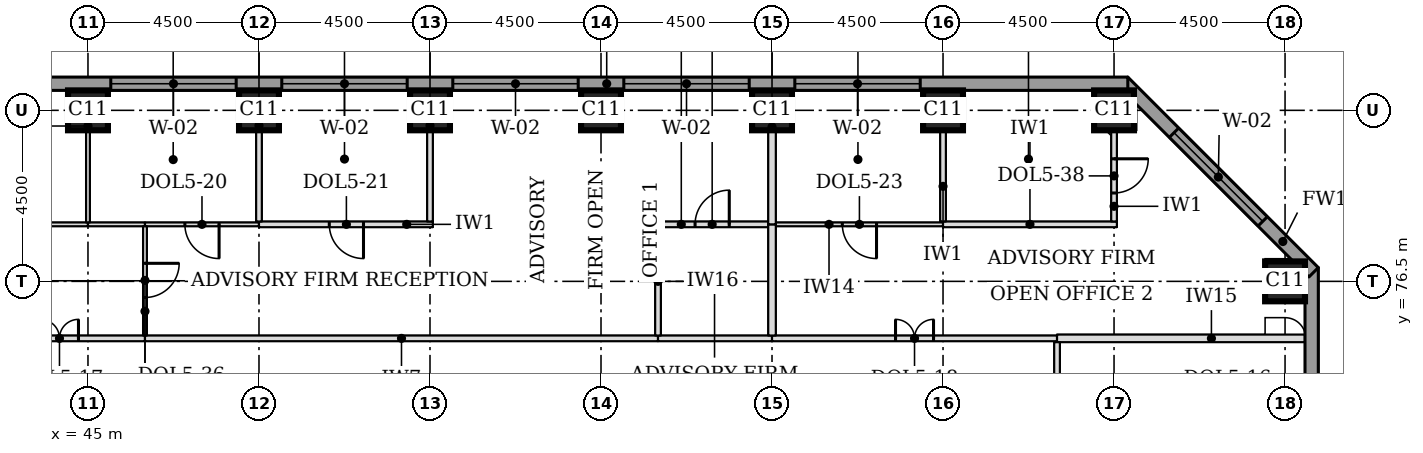
"""IFC4 building model, lengths in metres.
Left out: names, types, materials, properties, quantities, classifications, styles, units other than length and angle.
Written with IfcOpenShell. Run it as: python <this file> out.ifc"""

import sys

from ifc_helpers import new_model, si_unit, direction, frame, frame_2d, origin, origin_2d, place, context, subcontext, project, spatial, rectangle, extrude, element, fill, save


model = new_model("IFC4")
c1 = context("Model", 3, precision=1e-05, world=origin(), true_north=direction((0.0, 1.0)))
c2 = subcontext(c1, "Body", "Model", "MODEL_VIEW")
j1 = project(units=[si_unit("LENGTHUNIT", "METRE"), si_unit("PLANEANGLEUNIT", "RADIAN")], contexts=[c1])
p1 = place(None, origin())
s1 = spatial("IfcSite", under=j1, at=p1, CompositionType="ELEMENT")
p2 = place(p1, origin())
s2 = spatial("IfcBuilding", under=s1, at=p2, CompositionType="ELEMENT")
p3 = place(p2, frame((0.0, 0.0, 112.2)))
s3 = spatial("IfcBuildingStorey", under=s2, at=p3, CompositionType="ELEMENT", Elevation=112.2)
for number, where, z_axis, x_axis in (
    (1, (76.5, 76.5, 0.0), (0.0, 0.0, 1.0), (1.0, 0.0, 0.0)),
    (2, (45.0, 81.0, 0.0), (0.0, 0.0, 1.0), (1.0, 0.0, 0.0)),
    (3, (49.5, 81.0, 0.0), (0.0, 0.0, 1.0), (1.0, 0.0, 0.0)),
    (4, (54.0, 81.0, 0.0), (0.0, 0.0, 1.0), (1.0, 0.0, 0.0)),
    (5, (58.5, 81.0, 0.0), (0.0, 0.0, 1.0), (1.0, 0.0, 0.0)),
    (6, (63.0, 81.0, 0.0), (0.0, 0.0, 1.0), (1.0, 0.0, 0.0)),
    (7, (67.5, 81.0, 0.0), (0.0, 0.0, 1.0), (1.0, 0.0, 0.0)),
    (8, (72.0, 81.0, 0.0), (0.0, 0.0, 1.0), (1.0, 0.0, 0.0)),
):
    element("IfcColumn", number, at=place(p3, frame(where, z_axis=z_axis, x_axis=x_axis)), inside=s3, PredefinedType="COLUMN", context=c2, shape_type="SweptSolid", body=[
        extrude(rectangle(XDim=1.05, YDim=1.05, at=origin_2d()), origin(), (0.0, 0.0, 1.0), 3.7),
    ])
p4 = place(p3, frame((77.2, 44.638, 0.0), z_axis=(0.0, 0.0, 1.0), x_axis=(0.0, 1.0, 0.0)))
e9 = element("IfcWall", 9, at=p4, inside=s3, PredefinedType="STANDARD", context=c2, shape_type="SweptSolid", body=[
    extrude(rectangle(XDim=32.225, YDim=0.35, at=frame_2d((16.112, 0.0))), origin(), (0.0, 0.0, 1.0), 3.525),
])
p5 = place(p4, frame((5.462, 0.0, 0.9)))
e10 = element("IfcOpeningElement", 10, at=p5, cuts=e9, PredefinedType="OPENING", context=c2, shape_type="SweptSolid", body=[
    extrude(rectangle(XDim=3.3, YDim=1.9, at=frame_2d((1.65, 0.95))), frame((0.0, 0.185, 0.0), z_axis=(0.0, -1.0, 0.0), x_axis=(1.0, 0.0, 0.0)), (0.0, 0.0, 1.0), 0.37),
])
p6 = place(p4, frame((9.962, 0.0, 0.9)))
e11 = element("IfcOpeningElement", 11, at=p6, cuts=e9, PredefinedType="OPENING", context=c2, shape_type="SweptSolid", body=[
    extrude(rectangle(XDim=3.3, YDim=1.9, at=frame_2d((1.65, 0.95))), frame((0.0, 0.185, 0.0), z_axis=(0.0, -1.0, 0.0), x_axis=(1.0, 0.0, 0.0)), (0.0, 0.0, 1.0), 0.37),
])
p7 = place(p4, frame((14.462, 0.0, 0.9)))
e12 = element("IfcOpeningElement", 12, at=p7, cuts=e9, PredefinedType="OPENING", context=c2, shape_type="SweptSolid", body=[
    extrude(rectangle(XDim=3.3, YDim=1.9, at=frame_2d((1.65, 0.95))), frame((0.0, 0.185, 0.0), z_axis=(0.0, -1.0, 0.0), x_axis=(1.0, 0.0, 0.0)), (0.0, 0.0, 1.0), 0.37),
])
p8 = place(p4, frame((18.962, 0.0, 0.9)))
e13 = element("IfcOpeningElement", 13, at=p8, cuts=e9, PredefinedType="OPENING", context=c2, shape_type="SweptSolid", body=[
    extrude(rectangle(XDim=3.3, YDim=1.9, at=frame_2d((1.65, 0.95))), frame((0.0, 0.185, 0.0), z_axis=(0.0, -1.0, 0.0), x_axis=(1.0, 0.0, 0.0)), (0.0, 0.0, 1.0), 0.37),
])
p9 = place(p4, frame((23.462, 0.0, 0.9)))
e14 = element("IfcOpeningElement", 14, at=p9, cuts=e9, PredefinedType="OPENING", context=c2, shape_type="SweptSolid", body=[
    extrude(rectangle(XDim=3.3, YDim=1.9, at=frame_2d((1.65, 0.95))), frame((0.0, 0.185, 0.0), z_axis=(0.0, -1.0, 0.0), x_axis=(1.0, 0.0, 0.0)), (0.0, 0.0, 1.0), 0.37),
])
p10 = place(p3, frame((77.251, 76.739, 0.0), z_axis=(0.0, 0.0, 1.0), x_axis=(-0.707106781187, 0.707106781187, 0.0)))
e15 = element("IfcWall", 15, at=p10, inside=s3, PredefinedType="STANDARD", context=c2, shape_type="SweptSolid", body=[
    extrude(rectangle(XDim=7.089, YDim=0.35, at=frame_2d((3.544, 0.0))), origin(), (0.0, 0.0, 1.0), 3.525),
])
p11 = place(p10, frame((1.894, 0.0, 0.9)))
e16 = element("IfcOpeningElement", 16, at=p11, cuts=e15, PredefinedType="OPENING", context=c2, shape_type="SweptSolid", body=[
    extrude(rectangle(XDim=3.3, YDim=1.9, at=frame_2d((1.65, 0.95))), frame((0.0, 0.185, 0.0), z_axis=(0.0, -1.0, 0.0), x_axis=(1.0, 0.0, 0.0)), (0.0, 0.0, 1.0), 0.37),
])
p12 = place(p3, frame((72.362, 81.7, 0.0), z_axis=(0.0, 0.0, 1.0), x_axis=(-1.0, 0.0, 0.0)))
e17 = element("IfcWall", 17, at=p12, inside=s3, PredefinedType="STANDARD", context=c2, shape_type="SweptSolid", body=[
    extrude(rectangle(XDim=32.225, YDim=0.35, at=frame_2d((16.112, 0.0))), origin(), (0.0, 0.0, 1.0), 3.525),
])
p13 = place(p12, frame((5.462, 0.0, 0.9)))
e18 = element("IfcOpeningElement", 18, at=p13, cuts=e17, PredefinedType="OPENING", context=c2, shape_type="SweptSolid", body=[
    extrude(rectangle(XDim=3.3, YDim=1.9, at=frame_2d((1.65, 0.95))), frame((0.0, 0.185, 0.0), z_axis=(0.0, -1.0, 0.0), x_axis=(1.0, 0.0, 0.0)), (0.0, 0.0, 1.0), 0.37),
])
p14 = place(p12, frame((9.962, 0.0, 0.9)))
e19 = element("IfcOpeningElement", 19, at=p14, cuts=e17, PredefinedType="OPENING", context=c2, shape_type="SweptSolid", body=[
    extrude(rectangle(XDim=3.3, YDim=1.9, at=frame_2d((1.65, 0.95))), frame((0.0, 0.185, 0.0), z_axis=(0.0, -1.0, 0.0), x_axis=(1.0, 0.0, 0.0)), (0.0, 0.0, 1.0), 0.37),
])
p15 = place(p12, frame((14.462, 0.0, 0.9)))
e20 = element("IfcOpeningElement", 20, at=p15, cuts=e17, PredefinedType="OPENING", context=c2, shape_type="SweptSolid", body=[
    extrude(rectangle(XDim=3.3, YDim=1.9, at=frame_2d((1.65, 0.95))), frame((0.0, 0.185, 0.0), z_axis=(0.0, -1.0, 0.0), x_axis=(1.0, 0.0, 0.0)), (0.0, 0.0, 1.0), 0.37),
])
p16 = place(p12, frame((18.962, 0.0, 0.9)))
e21 = element("IfcOpeningElement", 21, at=p16, cuts=e17, PredefinedType="OPENING", context=c2, shape_type="SweptSolid", body=[
    extrude(rectangle(XDim=3.3, YDim=1.9, at=frame_2d((1.65, 0.95))), frame((0.0, 0.185, 0.0), z_axis=(0.0, -1.0, 0.0), x_axis=(1.0, 0.0, 0.0)), (0.0, 0.0, 1.0), 0.37),
])
p17 = place(p12, frame((23.462, 0.0, 0.9)))
e22 = element("IfcOpeningElement", 22, at=p17, cuts=e17, PredefinedType="OPENING", context=c2, shape_type="SweptSolid", body=[
    extrude(rectangle(XDim=3.3, YDim=1.9, at=frame_2d((1.65, 0.95))), frame((0.0, 0.185, 0.0), z_axis=(0.0, -1.0, 0.0), x_axis=(1.0, 0.0, 0.0)), (0.0, 0.0, 1.0), 0.37),
])
p18 = place(p3, frame((42.0, 75.0, 0.0), z_axis=(0.0, 0.0, 1.0), x_axis=(1.0, 0.0, 0.0)))
e23 = element("IfcWall", 23, at=p18, inside=s3, PredefinedType="PARTITIONING", context=c2, shape_type="SweptSolid", body=[
    extrude(rectangle(XDim=4.5, YDim=0.15, at=frame_2d((2.25, 0.0))), origin(), (0.0, 0.0, 1.0), 3.55),
])
p19 = place(p18, frame((1.75, 0.0, 0.0)))
e24 = element("IfcOpeningElement", 24, at=p19, cuts=e23, PredefinedType="OPENING", context=c2, shape_type="SweptSolid", body=[
    extrude(rectangle(XDim=1.0, YDim=2.1, at=frame_2d((0.5, 1.05))), frame((0.0, 0.085, 0.0), z_axis=(0.0, -1.0, 0.0), x_axis=(1.0, 0.0, 0.0)), (0.0, 0.0, 1.0), 0.17),
])
p20 = place(p3, frame((46.5, 75.0, 0.0), z_axis=(0.0, 0.0, 1.0), x_axis=(1.0, 0.0, 0.0)))
e25 = element("IfcWall", 25, at=p20, inside=s3, PredefinedType="PARTITIONING", context=c2, shape_type="SweptSolid", body=[
    extrude(rectangle(XDim=13.5, YDim=0.15, at=frame_2d((6.75, 0.0))), origin(), (0.0, 0.0, 1.0), 3.55),
])
p21 = place(p3, frame((60.0, 75.0, 0.0), z_axis=(0.0, 0.0, 1.0), x_axis=(1.0, 0.0, 0.0)))
e26 = element("IfcWall", 26, at=p21, inside=s3, PredefinedType="PARTITIONING", context=c2, shape_type="SweptSolid", body=[
    extrude(rectangle(XDim=3.0, YDim=0.15, at=frame_2d((1.5, 0.0))), origin(), (0.0, 0.0, 1.0), 3.55),
])
p22 = place(p3, frame((63.0, 75.0, 0.0), z_axis=(0.0, 0.0, 1.0), x_axis=(1.0, 0.0, 0.0)))
e27 = element("IfcWall", 27, at=p22, inside=s3, PredefinedType="PARTITIONING", context=c2, shape_type="SweptSolid", body=[
    extrude(rectangle(XDim=7.5, YDim=0.15, at=frame_2d((3.75, 0.0))), origin(), (0.0, 0.0, 1.0), 3.55),
])
p23 = place(p22, frame((3.25, 0.0, 0.0)))
e28 = element("IfcOpeningElement", 28, at=p23, cuts=e27, PredefinedType="OPENING", context=c2, shape_type="SweptSolid", body=[
    extrude(rectangle(XDim=1.0, YDim=2.1, at=frame_2d((0.5, 1.05))), frame((0.0, 0.085, 0.0), z_axis=(0.0, -1.0, 0.0), x_axis=(1.0, 0.0, 0.0)), (0.0, 0.0, 1.0), 0.17),
])
p24 = place(p3, frame((70.5, 75.0, 0.0), z_axis=(0.0, 0.0, 1.0), x_axis=(1.0, 0.0, 0.0)))
e29 = element("IfcWall", 29, at=p24, inside=s3, PredefinedType="PARTITIONING", context=c2, shape_type="SweptSolid", body=[
    extrude(rectangle(XDim=6.525, YDim=0.2, at=frame_2d((3.262, 0.0))), origin(), (0.0, 0.0, 1.0), 3.55),
])
p25 = place(p3, frame((40.55, 78.0, 0.0), z_axis=(0.0, 0.0, 1.0), x_axis=(1.0, 0.0, 0.0)))
e30 = element("IfcWall", 30, at=p25, inside=s3, PredefinedType="PARTITIONING", context=c2, shape_type="SweptSolid", body=[
    extrude(rectangle(XDim=4.45, YDim=0.1, at=frame_2d((2.225, 0.0))), origin(), (0.0, 0.0, 1.0), 3.55),
])
p26 = place(p25, frame((1.8, 0.0, 0.0)))
e31 = element("IfcOpeningElement", 31, at=p26, cuts=e30, PredefinedType="OPENING", context=c2, shape_type="SweptSolid", body=[
    extrude(rectangle(XDim=0.9, YDim=2.1, at=frame_2d((0.45, 1.05))), frame((0.0, 0.06, 0.0), z_axis=(0.0, -1.0, 0.0), x_axis=(1.0, 0.0, 0.0)), (0.0, 0.0, 1.0), 0.12),
])
p27 = place(p3, frame((45.0, 78.0, 0.0), z_axis=(0.0, 0.0, 1.0), x_axis=(1.0, 0.0, 0.0)))
e32 = element("IfcWall", 32, at=p27, inside=s3, PredefinedType="PARTITIONING", context=c2, shape_type="SweptSolid", body=[
    extrude(rectangle(XDim=1.5, YDim=0.1, at=frame_2d((0.75, 0.0))), origin(), (0.0, 0.0, 1.0), 3.55),
])
p28 = place(p3, frame((46.5, 78.0, 0.0), z_axis=(0.0, 0.0, 1.0), x_axis=(1.0, 0.0, 0.0)))
e33 = element("IfcWall", 33, at=p28, inside=s3, PredefinedType="PARTITIONING", context=c2, shape_type="SweptSolid", body=[
    extrude(rectangle(XDim=3.0, YDim=0.1, at=frame_2d((1.5, 0.0))), origin(), (0.0, 0.0, 1.0), 3.55),
])
p29 = place(p28, frame((1.05, 0.0, 0.0)))
e34 = element("IfcOpeningElement", 34, at=p29, cuts=e33, PredefinedType="OPENING", context=c2, shape_type="SweptSolid", body=[
    extrude(rectangle(XDim=0.9, YDim=2.1, at=frame_2d((0.45, 1.05))), frame((0.0, 0.06, 0.0), z_axis=(0.0, -1.0, 0.0), x_axis=(1.0, 0.0, 0.0)), (0.0, 0.0, 1.0), 0.12),
])
p30 = place(p3, frame((49.5, 78.0, 0.0), z_axis=(0.0, 0.0, 1.0), x_axis=(1.0, 0.0, 0.0)))
e35 = element("IfcWall", 35, at=p30, inside=s3, PredefinedType="PARTITIONING", context=c2, shape_type="SweptSolid", body=[
    extrude(rectangle(XDim=4.575, YDim=0.15, at=frame_2d((2.288, 0.0))), origin(), (0.0, 0.0, 1.0), 3.55),
])
p31 = place(p30, frame((1.85, 0.0, 0.0)))
e36 = element("IfcOpeningElement", 36, at=p31, cuts=e35, PredefinedType="OPENING", context=c2, shape_type="SweptSolid", body=[
    extrude(rectangle(XDim=0.9, YDim=2.1, at=frame_2d((0.45, 1.05))), frame((0.0, 0.085, 0.0), z_axis=(0.0, -1.0, 0.0), x_axis=(1.0, 0.0, 0.0)), (0.0, 0.0, 1.0), 0.17),
])
p32 = place(p3, frame((59.925, 78.0, 0.0), z_axis=(0.0, 0.0, 1.0), x_axis=(1.0, 0.0, 0.0)))
e37 = element("IfcWall", 37, at=p32, inside=s3, PredefinedType="PARTITIONING", context=c2, shape_type="SweptSolid", body=[
    extrude(rectangle(XDim=2.975, YDim=0.15, at=frame_2d((1.487, 0.0))), origin(), (0.0, 0.0, 1.0), 3.55),
])
p33 = place(p32, frame((1.05, 0.0, 0.0)))
e38 = element("IfcOpeningElement", 38, at=p33, cuts=e37, PredefinedType="OPENING", context=c2, shape_type="SweptSolid", body=[
    extrude(rectangle(XDim=0.9, YDim=2.1, at=frame_2d((0.45, 1.05))), frame((0.0, 0.085, 0.0), z_axis=(0.0, -1.0, 0.0), x_axis=(1.0, 0.0, 0.0)), (0.0, 0.0, 1.0), 0.17),
])
p34 = place(p3, frame((63.1, 78.0, 0.0), z_axis=(0.0, 0.0, 1.0), x_axis=(1.0, 0.0, 0.0)))
e39 = element("IfcWall", 39, at=p34, inside=s3, PredefinedType="PARTITIONING", context=c2, shape_type="SweptSolid", body=[
    extrude(rectangle(XDim=4.4, YDim=0.1, at=frame_2d((2.2, 0.0))), origin(), (0.0, 0.0, 1.0), 3.55),
])
p35 = place(p34, frame((1.75, 0.0, 0.0)))
e40 = element("IfcOpeningElement", 40, at=p35, cuts=e39, PredefinedType="OPENING", context=c2, shape_type="SweptSolid", body=[
    extrude(rectangle(XDim=0.9, YDim=2.1, at=frame_2d((0.45, 1.05))), frame((0.0, 0.06, 0.0), z_axis=(0.0, -1.0, 0.0), x_axis=(1.0, 0.0, 0.0)), (0.0, 0.0, 1.0), 0.12),
])
p36 = place(p3, frame((67.5, 78.0, 0.0), z_axis=(0.0, 0.0, 1.0), x_axis=(1.0, 0.0, 0.0)))
e41 = element("IfcWall", 41, at=p36, inside=s3, PredefinedType="PARTITIONING", context=c2, shape_type="SweptSolid", body=[
    extrude(rectangle(XDim=4.575, YDim=0.15, at=frame_2d((2.288, 0.0))), origin(), (0.0, 0.0, 1.0), 3.55),
])
p37 = place(p3, frame((70.5, 57.0, 0.0), z_axis=(0.0, 0.0, 1.0), x_axis=(0.0, 1.0, 0.0)))
e42 = element("IfcWall", 42, at=p37, inside=s3, PredefinedType="PARTITIONING", context=c2, shape_type="SweptSolid", body=[
    extrude(rectangle(XDim=17.9, YDim=0.15, at=frame_2d((8.95, 0.0))), origin(), (0.0, 0.0, 1.0), 3.55),
])
p38 = place(p37, frame((8.45, 0.0, 0.0)))
e43 = element("IfcOpeningElement", 43, at=p38, cuts=e42, PredefinedType="OPENING", context=c2, shape_type="SweptSolid", body=[
    extrude(rectangle(XDim=1.0, YDim=2.1, at=frame_2d((0.5, 1.05))), frame((0.0, 0.085, 0.0), z_axis=(0.0, -1.0, 0.0), x_axis=(1.0, 0.0, 0.0)), (0.0, 0.0, 1.0), 0.17),
])
p39 = place(p3, frame((46.5, 75.075, 0.0), z_axis=(0.0, 0.0, 1.0), x_axis=(0.0, 1.0, 0.0)))
e44 = element("IfcWall", 44, at=p39, inside=s3, PredefinedType="PARTITIONING", context=c2, shape_type="SweptSolid", body=[
    extrude(rectangle(XDim=2.875, YDim=0.1, at=frame_2d((1.438, 0.0))), origin(), (0.0, 0.0, 1.0), 3.022),
])
p40 = place(p39, frame((1.0, 0.0, 0.0)))
e45 = element("IfcOpeningElement", 45, at=p40, cuts=e44, PredefinedType="OPENING", context=c2, shape_type="SweptSolid", body=[
    extrude(rectangle(XDim=0.9, YDim=2.1, at=frame_2d((0.45, 1.05))), frame((0.0, 0.06, 0.0), z_axis=(0.0, -1.0, 0.0), x_axis=(1.0, 0.0, 0.0)), (0.0, 0.0, 1.0), 0.12),
])
p41 = place(p3, frame((60.0, 75.075, 0.0), z_axis=(0.0, 0.0, 1.0), x_axis=(0.0, 1.0, 0.0)))
e46 = element("IfcWall", 46, at=p41, inside=s3, PredefinedType="PARTITIONING", context=c2, shape_type="SweptSolid", body=[
    extrude(rectangle(XDim=2.85, YDim=0.15, at=frame_2d((1.425, 0.0))), origin(), (0.0, 0.0, 1.0), 3.55),
])
p42 = place(p3, frame((63.0, 75.075, 0.0), z_axis=(0.0, 0.0, 1.0), x_axis=(0.0, 1.0, 0.0)))
e47 = element("IfcWall", 47, at=p42, inside=s3, PredefinedType="PARTITIONING", context=c2, shape_type="SweptSolid", body=[
    extrude(rectangle(XDim=2.925, YDim=0.2, at=frame_2d((1.462, 0.0))), origin(), (0.0, 0.0, 1.0), 3.55),
])
p43 = place(p3, frame((63.0, 78.0, 0.0), z_axis=(0.0, 0.0, 1.0), x_axis=(0.0, 1.0, 0.0)))
e48 = element("IfcWall", 48, at=p43, inside=s3, PredefinedType="PARTITIONING", context=c2, shape_type="SweptSolid", body=[
    extrude(rectangle(XDim=3.525, YDim=0.2, at=frame_2d((1.762, 0.0))), origin(), (0.0, 0.0, 1.0), 3.55),
])
p44 = place(p3, frame((45.0, 78.05, 0.0), z_axis=(0.0, 0.0, 1.0), x_axis=(0.0, 1.0, 0.0)))
e49 = element("IfcWall", 49, at=p44, inside=s3, PredefinedType="PARTITIONING", context=c2, shape_type="SweptSolid", body=[
    extrude(rectangle(XDim=3.475, YDim=0.1, at=frame_2d((1.737, 0.0))), origin(), (0.0, 0.0, 1.0), 3.55),
])
for number, where, z_axis, x_axis in (
    (50, (49.5, 78.075, 0.0), (0.0, 0.0, 1.0), (0.0, 1.0, 0.0)),
    (51, (54.0, 78.075, 0.0), (0.0, 0.0, 1.0), (0.0, 1.0, 0.0)),
    (52, (67.5, 78.075, 0.0), (0.0, 0.0, 1.0), (0.0, 1.0, 0.0)),
):
    element("IfcWall", number, at=place(p3, frame(where, z_axis=z_axis, x_axis=x_axis)), inside=s3, PredefinedType="PARTITIONING", context=c2, shape_type="SweptSolid", body=[
        extrude(rectangle(XDim=3.45, YDim=0.15, at=frame_2d((1.725, 0.0))), origin(), (0.0, 0.0, 1.0), 3.55),
    ])
p45 = place(p3, frame((72.0, 78.075, 0.0), z_axis=(0.0, 0.0, 1.0), x_axis=(0.0, 1.0, 0.0)))
e53 = element("IfcWall", 53, at=p45, inside=s3, PredefinedType="PARTITIONING", context=c2, shape_type="SweptSolid", body=[
    extrude(rectangle(XDim=2.4, YDim=0.15, at=frame_2d((1.2, 0.0))), origin(), (0.0, 0.0, 1.0), 3.55),
])
p46 = place(p45, frame((0.75, 0.0, 0.0)))
e54 = element("IfcOpeningElement", 54, at=p46, cuts=e53, PredefinedType="OPENING", context=c2, shape_type="SweptSolid", body=[
    extrude(rectangle(XDim=0.9, YDim=2.1, at=frame_2d((0.45, 1.05))), frame((0.0, 0.085, 0.0), z_axis=(0.0, -1.0, 0.0), x_axis=(1.0, 0.0, 0.0)), (0.0, 0.0, 1.0), 0.17),
])
p47 = place(p11, origin())
e55 = element("IfcWindow", 55, at=p47, inside=s3, PartitioningType="SINGLE_PANEL", PredefinedType="WINDOW", context=c2, shape_type="SweptSolid", body=[
    extrude(rectangle(XDim=3.3, YDim=1.9, at=frame_2d((1.65, 0.95))), frame((0.0, 0.085, 0.0), z_axis=(0.0, -1.0, 0.0), x_axis=(1.0, 0.0, 0.0)), (0.0, 0.0, 1.0), 0.06),
])
fill(e16, e55)
p48 = place(p13, origin())
e56 = element("IfcWindow", 56, at=p48, inside=s3, PartitioningType="SINGLE_PANEL", PredefinedType="WINDOW", context=c2, shape_type="SweptSolid", body=[
    extrude(rectangle(XDim=3.3, YDim=1.9, at=frame_2d((1.65, 0.95))), frame((0.0, 0.085, 0.0), z_axis=(0.0, -1.0, 0.0), x_axis=(1.0, 0.0, 0.0)), (0.0, 0.0, 1.0), 0.06),
])
fill(e18, e56)
p49 = place(p14, origin())
e57 = element("IfcWindow", 57, at=p49, inside=s3, PartitioningType="SINGLE_PANEL", PredefinedType="WINDOW", context=c2, shape_type="SweptSolid", body=[
    extrude(rectangle(XDim=3.3, YDim=1.9, at=frame_2d((1.65, 0.95))), frame((0.0, 0.085, 0.0), z_axis=(0.0, -1.0, 0.0), x_axis=(1.0, 0.0, 0.0)), (0.0, 0.0, 1.0), 0.06),
])
fill(e19, e57)
p50 = place(p15, origin())
e58 = element("IfcWindow", 58, at=p50, inside=s3, PartitioningType="SINGLE_PANEL", PredefinedType="WINDOW", context=c2, shape_type="SweptSolid", body=[
    extrude(rectangle(XDim=3.3, YDim=1.9, at=frame_2d((1.65, 0.95))), frame((0.0, 0.085, 0.0), z_axis=(0.0, -1.0, 0.0), x_axis=(1.0, 0.0, 0.0)), (0.0, 0.0, 1.0), 0.06),
])
fill(e20, e58)
p51 = place(p16, origin())
e59 = element("IfcWindow", 59, at=p51, inside=s3, PartitioningType="SINGLE_PANEL", PredefinedType="WINDOW", context=c2, shape_type="SweptSolid", body=[
    extrude(rectangle(XDim=3.3, YDim=1.9, at=frame_2d((1.65, 0.95))), frame((0.0, 0.085, 0.0), z_axis=(0.0, -1.0, 0.0), x_axis=(1.0, 0.0, 0.0)), (0.0, 0.0, 1.0), 0.06),
])
fill(e21, e59)
p52 = place(p17, origin())
e60 = element("IfcWindow", 60, at=p52, inside=s3, PartitioningType="SINGLE_PANEL", PredefinedType="WINDOW", context=c2, shape_type="SweptSolid", body=[
    extrude(rectangle(XDim=3.3, YDim=1.9, at=frame_2d((1.65, 0.95))), frame((0.0, 0.085, 0.0), z_axis=(0.0, -1.0, 0.0), x_axis=(1.0, 0.0, 0.0)), (0.0, 0.0, 1.0), 0.06),
])
fill(e22, e60)
p53 = place(p19, origin())
e61 = element("IfcDoor", 61, at=p53, inside=s3, OperationType="DOUBLE_DOOR_SINGLE_SWING", PredefinedType="DOOR", context=c2, shape_type="SweptSolid", body=[
    extrude(rectangle(XDim=1.0, YDim=2.1, at=frame_2d((0.5, 1.05))), frame((0.0, 0.025, 0.0), z_axis=(0.0, -1.0, 0.0), x_axis=(1.0, 0.0, 0.0)), (0.0, 0.0, 1.0), 0.05),
])
fill(e24, e61)
p54 = place(p40, frame((0.9, 0.0, 0.0), z_axis=(0.0, 0.0, 1.0), x_axis=(-1.0, 0.0, 0.0)))
e62 = element("IfcDoor", 62, at=p54, inside=s3, OperationType="SINGLE_SWING_LEFT", PredefinedType="DOOR", context=c2, shape_type="SweptSolid", body=[
    extrude(rectangle(XDim=0.9, YDim=2.1, at=frame_2d((0.45, 1.05))), frame((0.0, 0.025, 0.0), z_axis=(0.0, -1.0, 0.0), x_axis=(1.0, 0.0, 0.0)), (0.0, 0.0, 1.0), 0.05),
])
fill(e45, e62)
p55 = place(p29, frame((0.9, 0.0, 0.0), z_axis=(0.0, 0.0, 1.0), x_axis=(-1.0, 0.0, 0.0)))
e63 = element("IfcDoor", 63, at=p55, inside=s3, OperationType="SINGLE_SWING_LEFT", PredefinedType="DOOR", context=c2, shape_type="SweptSolid", body=[
    extrude(rectangle(XDim=0.9, YDim=2.1, at=frame_2d((0.45, 1.05))), frame((0.0, 0.025, 0.0), z_axis=(0.0, -1.0, 0.0), x_axis=(1.0, 0.0, 0.0)), (0.0, 0.0, 1.0), 0.05),
])
fill(e34, e63)
p56 = place(p33, origin())
e64 = element("IfcDoor", 64, at=p56, inside=s3, OperationType="SINGLE_SWING_RIGHT", PredefinedType="DOOR", context=c2, shape_type="SweptSolid", body=[
    extrude(rectangle(XDim=0.9, YDim=2.1, at=frame_2d((0.45, 1.05))), frame((0.0, 0.025, 0.0), z_axis=(0.0, -1.0, 0.0), x_axis=(1.0, 0.0, 0.0)), (0.0, 0.0, 1.0), 0.05),
])
fill(e38, e64)
p57 = place(p31, frame((0.9, 0.0, 0.0), z_axis=(0.0, 0.0, 1.0), x_axis=(-1.0, 0.0, 0.0)))
e65 = element("IfcDoor", 65, at=p57, inside=s3, OperationType="SINGLE_SWING_LEFT", PredefinedType="DOOR", context=c2, shape_type="SweptSolid", body=[
    extrude(rectangle(XDim=0.9, YDim=2.1, at=frame_2d((0.45, 1.05))), frame((0.0, 0.025, 0.0), z_axis=(0.0, -1.0, 0.0), x_axis=(1.0, 0.0, 0.0)), (0.0, 0.0, 1.0), 0.05),
])
fill(e36, e65)
p58 = place(p23, origin())
e66 = element("IfcDoor", 66, at=p58, inside=s3, OperationType="DOUBLE_DOOR_SINGLE_SWING", PredefinedType="DOOR", context=c2, shape_type="SweptSolid", body=[
    extrude(rectangle(XDim=1.0, YDim=2.1, at=frame_2d((0.5, 1.05))), frame((0.0, 0.025, 0.0), z_axis=(0.0, -1.0, 0.0), x_axis=(1.0, 0.0, 0.0)), (0.0, 0.0, 1.0), 0.05),
])
fill(e28, e66)
p59 = place(p35, frame((0.9, 0.0, 0.0), z_axis=(0.0, 0.0, 1.0), x_axis=(-1.0, 0.0, 0.0)))
e67 = element("IfcDoor", 67, at=p59, inside=s3, OperationType="SINGLE_SWING_LEFT", PredefinedType="DOOR", context=c2, shape_type="SweptSolid", body=[
    extrude(rectangle(XDim=0.9, YDim=2.1, at=frame_2d((0.45, 1.05))), frame((0.0, 0.025, 0.0), z_axis=(0.0, -1.0, 0.0), x_axis=(1.0, 0.0, 0.0)), (0.0, 0.0, 1.0), 0.05),
])
fill(e40, e67)
p60 = place(p46, frame((0.9, 0.0, 0.0), z_axis=(0.0, 0.0, 1.0), x_axis=(-1.0, 0.0, 0.0)))
e68 = element("IfcDoor", 68, at=p60, inside=s3, OperationType="SINGLE_SWING_LEFT", PredefinedType="DOOR", context=c2, shape_type="SweptSolid", body=[
    extrude(rectangle(XDim=0.9, YDim=2.1, at=frame_2d((0.45, 1.05))), frame((0.0, 0.025, 0.0), z_axis=(0.0, -1.0, 0.0), x_axis=(1.0, 0.0, 0.0)), (0.0, 0.0, 1.0), 0.05),
])
fill(e54, e68)
save(model, sys.argv[1])
